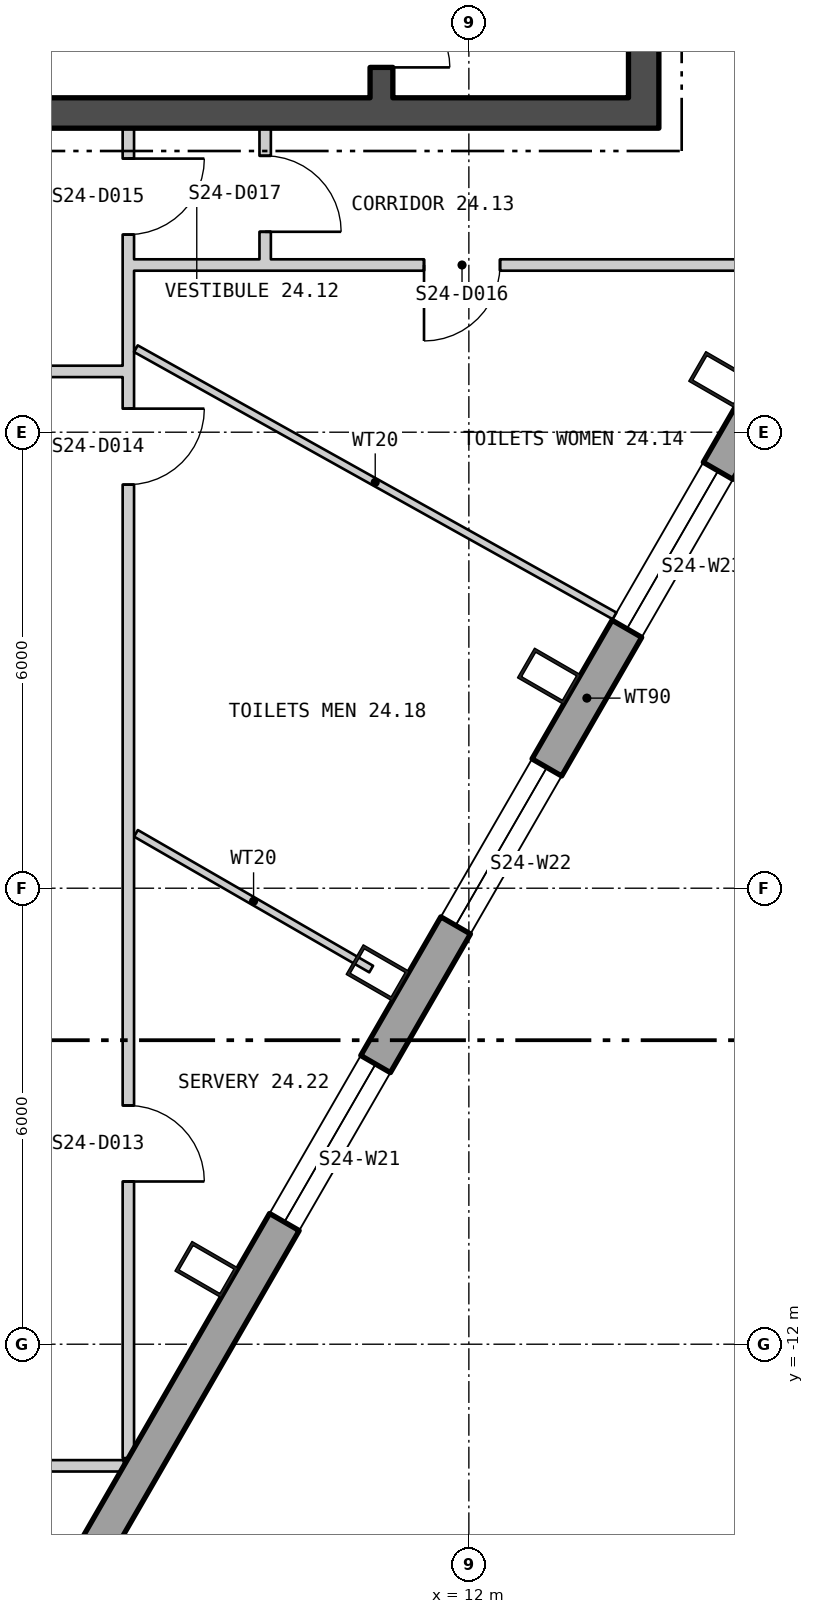
"""IFC4 building model, lengths in metres.
Left out: names, types, materials, properties, quantities, classifications, styles, units other than length and angle.
Written with IfcOpenShell. Run it as: python <this file> out.ifc"""

import sys

from ifc_helpers import new_model, si_unit, direction, frame, frame_2d, origin, origin_2d, place, context, subcontext, project, spatial, polyline, rectangle, hollow_rectangle, outline, extrude, element, fill, save


model = new_model("IFC4")
c1 = context("Model", 3, precision=1e-05, world=origin(), true_north=direction((0.0, 1.0)))
c2 = subcontext(c1, "Body", "Model", "MODEL_VIEW")
j1 = project(units=[si_unit("LENGTHUNIT", "METRE"), si_unit("PLANEANGLEUNIT", "RADIAN")], contexts=[c1])
p1 = place(None, origin())
s1 = spatial("IfcSite", under=j1, at=p1, CompositionType="ELEMENT")
p2 = place(p1, origin())
s2 = spatial("IfcBuilding", under=s1, at=p2, CompositionType="ELEMENT")
p3 = place(p2, frame((0.0, 0.0, 312.6)))
s3 = spatial("IfcBuildingStorey", under=s2, at=p3, CompositionType="ELEMENT", Elevation=312.6)
for number, where, z_axis, x_axis in (
    (1, (8.548, -11.017, 0.0), (0.0, 0.0, 1.0), (0.5, 0.866, 0.0)),
    (2, (10.801, -7.114, 0.0), (0.0, 0.0, 1.0), (0.5, 0.866, 0.0)),
    (3, (13.055, -3.211, 0.0), (0.0, 0.0, 1.0), (0.5, 0.866, 0.0)),
    (4, (15.308, 0.691, 0.0), (0.0, 0.0, 1.0), (0.5, 0.866, 0.0)),
):
    element("IfcColumn", number, at=place(p3, frame(where, z_axis=z_axis, x_axis=x_axis)), inside=s3, PredefinedType="COLUMN", context=c2, shape_type="SweptSolid", body=[
        extrude(hollow_rectangle(XDim=0.45, YDim=0.7, WallThickness=0.04, at=origin_2d()), origin(), (0.0, 0.0, 1.0), 4.2),
    ])
p4 = place(p3, frame((2.12, -23.301, -0.18), z_axis=(0.0, 0.0, 1.0), x_axis=(0.500000141277, 0.866025322218, 0.0)))
e5 = element("IfcWall", 5, at=p4, inside=s3, PredefinedType="SOLIDWALL", context=c2, shape_type="SweptSolid", body=[
    extrude(outline(polyline([(-0.13, -0.225), (45.86, -0.225), (45.6, 0.225), (0.13, 0.225), (-0.13, -0.225)])), origin(), (0.0, 0.0, 1.0), 3.98),
])
p5 = place(p4, frame((1.424, 0.0, 1.08)))
e6 = element("IfcOpeningElement", 6, at=p5, cuts=e5, PredefinedType="OPENING", context=c2, shape_type="SweptSolid", body=[
    extrude(rectangle(XDim=2.4, YDim=2.3, at=frame_2d((1.2, 1.15))), frame((0.0, 0.235, 0.0), z_axis=(0.0, -1.0, 0.0), x_axis=(1.0, 0.0, 0.0)), (0.0, 0.0, 1.0), 0.47),
])
p6 = place(p4, frame((5.892, 0.0, 1.08)))
e7 = element("IfcOpeningElement", 7, at=p6, cuts=e5, PredefinedType="OPENING", context=c2, shape_type="SweptSolid", body=[
    extrude(rectangle(XDim=2.4, YDim=2.3, at=frame_2d((1.2, 1.15))), frame((0.0, 0.235, 0.0), z_axis=(0.0, -1.0, 0.0), x_axis=(1.0, 0.0, 0.0)), (0.0, 0.0, 1.0), 0.47),
])
p7 = place(p4, frame((14.905, 0.0, 1.08)))
e8 = element("IfcOpeningElement", 8, at=p7, cuts=e5, PredefinedType="OPENING", context=c2, shape_type="SweptSolid", body=[
    extrude(rectangle(XDim=2.4, YDim=2.3, at=frame_2d((1.2, 1.15))), frame((0.0, 0.235, 0.0), z_axis=(0.0, -1.0, 0.0), x_axis=(1.0, 0.0, 0.0)), (0.0, 0.0, 1.0), 0.47),
])
p8 = place(p4, frame((19.412, 0.0, 1.08)))
e9 = element("IfcOpeningElement", 9, at=p8, cuts=e5, PredefinedType="OPENING", context=c2, shape_type="SweptSolid", body=[
    extrude(rectangle(XDim=2.4, YDim=2.3, at=frame_2d((1.2, 1.15))), frame((0.0, 0.235, 0.0), z_axis=(0.0, -1.0, 0.0), x_axis=(1.0, 0.0, 0.0)), (0.0, 0.0, 1.0), 0.47),
])
p9 = place(p4, frame((23.918, 0.0, 1.08)))
e10 = element("IfcOpeningElement", 10, at=p9, cuts=e5, PredefinedType="OPENING", context=c2, shape_type="SweptSolid", body=[
    extrude(rectangle(XDim=2.4, YDim=2.3, at=frame_2d((1.2, 1.15))), frame((0.0, 0.235, 0.0), z_axis=(0.0, -1.0, 0.0), x_axis=(1.0, 0.0, 0.0)), (0.0, 0.0, 1.0), 0.47),
])
p10 = place(p4, frame((28.425, 0.0, 1.08)))
e11 = element("IfcOpeningElement", 11, at=p10, cuts=e5, PredefinedType="OPENING", context=c2, shape_type="SweptSolid", body=[
    extrude(rectangle(XDim=2.4, YDim=2.3, at=frame_2d((1.2, 1.15))), frame((0.0, 0.235, 0.0), z_axis=(0.0, -1.0, 0.0), x_axis=(1.0, 0.0, 0.0)), (0.0, 0.0, 1.0), 0.47),
])
p11 = place(p4, frame((37.438, 0.0, 1.08)))
e12 = element("IfcOpeningElement", 12, at=p11, cuts=e5, PredefinedType="OPENING", context=c2, shape_type="SweptSolid", body=[
    extrude(rectangle(XDim=2.4, YDim=2.3, at=frame_2d((1.2, 1.15))), frame((0.0, 0.235, 0.0), z_axis=(0.0, -1.0, 0.0), x_axis=(1.0, 0.0, 0.0)), (0.0, 0.0, 1.0), 0.47),
])
p12 = place(p4, frame((41.907, 0.0, 1.08)))
e13 = element("IfcOpeningElement", 13, at=p12, cuts=e5, PredefinedType="OPENING", context=c2, shape_type="SweptSolid", body=[
    extrude(rectangle(XDim=2.4, YDim=2.3, at=frame_2d((1.2, 1.15))), frame((0.0, 0.235, 0.0), z_axis=(0.0, -1.0, 0.0), x_axis=(1.0, 0.0, 0.0)), (0.0, 0.0, 1.0), 0.47),
])
p13 = place(p3, frame((-14.5, 4.2, 0.0), z_axis=(0.0, 0.0, 1.0), x_axis=(1.0, 0.0, 0.0)))
e14 = element("IfcWall", 14, at=p13, inside=s3, PredefinedType="SHEAR", context=c2, shape_type="SweptSolid", body=[
    extrude(rectangle(XDim=29.0, YDim=0.4, at=frame_2d((14.5, 0.0))), origin(), (0.0, 0.0, 1.0), 4.0),
])
p14 = place(p13, frame((9.0, 0.0, 0.0)))
e15 = element("IfcOpeningElement", 15, at=p14, cuts=e14, PredefinedType="OPENING", context=c2, shape_type="SweptSolid", body=[
    extrude(rectangle(XDim=1.8, YDim=2.4, at=frame_2d((0.9, 1.2))), frame((0.0, 0.21, 0.0), z_axis=(0.0, -1.0, 0.0), x_axis=(1.0, 0.0, 0.0)), (0.0, 0.0, 1.0), 0.42),
])
p15 = place(p13, frame((19.0, 0.0, 0.0)))
e16 = element("IfcOpeningElement", 16, at=p15, cuts=e14, PredefinedType="OPENING", context=c2, shape_type="SweptSolid", body=[
    extrude(rectangle(XDim=1.8, YDim=2.4, at=frame_2d((0.9, 1.2))), frame((0.0, 0.21, 0.0), z_axis=(0.0, -1.0, 0.0), x_axis=(1.0, 0.0, 0.0)), (0.0, 0.0, 1.0), 0.42),
])
p16 = place(p3, frame((14.3, 4.4, 0.0), z_axis=(0.0, 0.0, 1.0), x_axis=(0.0, 1.0, 0.0)))
e17 = element("IfcWall", 17, at=p16, inside=s3, PredefinedType="SHEAR", context=c2, shape_type="SweptSolid", body=[
    extrude(rectangle(XDim=13.2, YDim=0.4, at=frame_2d((6.6, 0.0))), origin(), (0.0, 0.0, 1.0), 4.0),
])
p17 = place(p16, frame((3.05, 0.0, 0.0)))
e18 = element("IfcOpeningElement", 18, at=p17, cuts=e17, PredefinedType="OPENING", context=c2, shape_type="SweptSolid", body=[
    extrude(rectangle(XDim=1.5, YDim=2.1, at=frame_2d((0.75, 1.05))), frame((0.0, 0.21, 0.0), z_axis=(0.0, -1.0, 0.0), x_axis=(1.0, 0.0, 0.0)), (0.0, 0.0, 1.0), 0.42),
])
p18 = place(p3, frame((10.85, 4.4, 0.0), z_axis=(0.0, 0.0, 1.0), x_axis=(0.0, 1.0, 0.0)))
e19 = element("IfcWall", 19, at=p18, inside=s3, PredefinedType="SHEAR", context=c2, shape_type="SweptSolid", body=[
    extrude(rectangle(XDim=13.2, YDim=0.3, at=frame_2d((6.6, 0.0))), origin(), (0.0, 0.0, 1.0), 4.0),
])
p19 = place(p18, frame((1.575, 0.0, 0.0)))
e20 = element("IfcOpeningElement", 20, at=p19, cuts=e19, PredefinedType="OPENING", context=c2, shape_type="SweptSolid", body=[
    extrude(rectangle(XDim=1.25, YDim=2.1, at=frame_2d((0.625, 1.05))), frame((0.0, 0.16, 0.0), z_axis=(0.0, -1.0, 0.0), x_axis=(1.0, 0.0, 0.0)), (0.0, 0.0, 1.0), 0.32),
])
p20 = place(p18, frame((0.4, 0.0, 0.0)))
e21 = element("IfcOpeningElement", 21, at=p20, cuts=e19, PredefinedType="OPENING", context=c2, shape_type="SweptSolid", body=[
    extrude(rectangle(XDim=0.9, YDim=2.1, at=frame_2d((0.45, 1.05))), frame((0.0, 0.16, 0.0), z_axis=(0.0, -1.0, 0.0), x_axis=(1.0, 0.0, 0.0)), (0.0, 0.0, 1.0), 0.32),
])
p21 = place(p3, frame((-7.52, 0.8, 0.0), z_axis=(0.0, 0.0, 1.0), x_axis=(1.0, 0.0, 0.0)))
e22 = element("IfcWall", 22, at=p21, inside=s3, PredefinedType="PARTITIONING", context=c2, shape_type="SweptSolid", body=[
    extrude(rectangle(XDim=14.965, YDim=0.15, at=frame_2d((7.482, 0.0))), origin(), (0.0, 0.0, 1.0), 4.0),
])
p22 = place(p21, frame((1.206, 0.0, 0.0)))
e23 = element("IfcOpeningElement", 23, at=p22, cuts=e22, PredefinedType="OPENING", context=c2, shape_type="SweptSolid", body=[
    extrude(rectangle(XDim=1.0, YDim=2.1, at=frame_2d((0.5, 1.05))), frame((0.0, 0.085, 0.0), z_axis=(0.0, -1.0, 0.0), x_axis=(1.0, 0.0, 0.0)), (0.0, 0.0, 1.0), 0.17),
])
p23 = place(p21, frame((12.796, 0.0, 0.0)))
e24 = element("IfcOpeningElement", 24, at=p23, cuts=e22, PredefinedType="OPENING", context=c2, shape_type="SweptSolid", body=[
    extrude(rectangle(XDim=1.0, YDim=2.1, at=frame_2d((0.5, 1.05))), frame((0.0, 0.085, 0.0), z_axis=(0.0, -1.0, 0.0), x_axis=(1.0, 0.0, 0.0)), (0.0, 0.0, 1.0), 0.17),
])
p24 = place(p3, frame((4.3, -13.6, 0.0), z_axis=(0.0, 0.0, 1.0), x_axis=(1.0, 0.0, 0.0)))
e25 = element("IfcWall", 25, at=p24, inside=s3, PredefinedType="PARTITIONING", context=c2, shape_type="SweptSolid", body=[
    extrude(rectangle(XDim=2.555, YDim=0.15, at=frame_2d((1.278, 0.0))), origin(), (0.0, 0.0, 1.0), 3.21),
])
p25 = place(p24, frame((0.2, 0.0, 0.0)))
e26 = element("IfcOpeningElement", 26, at=p25, cuts=e25, PredefinedType="OPENING", context=c2, shape_type="SweptSolid", body=[
    extrude(rectangle(XDim=1.0, YDim=2.1, at=frame_2d((0.5, 1.05))), frame((0.0, 0.085, 0.0), z_axis=(0.0, -1.0, 0.0), x_axis=(1.0, 0.0, 0.0)), (0.0, 0.0, 1.0), 0.17),
])
p26 = place(p3, frame((6.855, -13.6, 0.0), z_axis=(0.0, 0.0, 1.0), x_axis=(1.0, 0.0, 0.0)))
e27 = element("IfcWall", 27, at=p26, inside=s3, PredefinedType="PARTITIONING", context=c2, shape_type="SweptSolid", body=[
    extrude(rectangle(XDim=0.606, YDim=0.15, at=frame_2d((0.303, 0.0))), origin(), (0.0, 0.0, 1.0), 4.0),
])
p27 = place(p3, frame((7.52, -13.498, 0.0), z_axis=(0.0, 0.0, 1.0), x_axis=(0.0, 1.0, 0.0)))
e28 = element("IfcWall", 28, at=p27, inside=s3, PredefinedType="PARTITIONING", context=c2, shape_type="SweptSolid", body=[
    extrude(rectangle(XDim=17.498, YDim=0.15, at=frame_2d((8.749, 0.0))), origin(), (0.0, 0.0, 1.0), 4.0),
])
p28 = place(p27, frame((3.639, 0.0, 0.0)))
e29 = element("IfcOpeningElement", 29, at=p28, cuts=e28, PredefinedType="OPENING", context=c2, shape_type="SweptSolid", body=[
    extrude(rectangle(XDim=1.0, YDim=2.1, at=frame_2d((0.5, 1.05))), frame((0.0, 0.085, 0.0), z_axis=(0.0, -1.0, 0.0), x_axis=(1.0, 0.0, 0.0)), (0.0, 0.0, 1.0), 0.17),
])
p29 = place(p27, frame((12.808, 0.0, 0.0)))
e30 = element("IfcOpeningElement", 30, at=p29, cuts=e28, PredefinedType="OPENING", context=c2, shape_type="SweptSolid", body=[
    extrude(rectangle(XDim=1.0, YDim=2.1, at=frame_2d((0.5, 1.05))), frame((0.0, 0.085, 0.0), z_axis=(0.0, -1.0, 0.0), x_axis=(1.0, 0.0, 0.0)), (0.0, 0.0, 1.0), 0.17),
])
p30 = place(p27, frame((16.098, 0.0, 0.0)))
e31 = element("IfcOpeningElement", 31, at=p30, cuts=e28, PredefinedType="OPENING", context=c2, shape_type="SweptSolid", body=[
    extrude(rectangle(XDim=1.0, YDim=2.1, at=frame_2d((0.5, 1.05))), frame((0.0, 0.085, 0.0), z_axis=(0.0, -1.0, 0.0), x_axis=(1.0, 0.0, 0.0)), (0.0, 0.0, 1.0), 0.17),
])
p31 = place(p3, frame((7.595, 2.2, 0.0), z_axis=(0.0, 0.0, 1.0), x_axis=(1.0, 0.0, 0.0)))
e32 = element("IfcWall", 32, at=p31, inside=s3, PredefinedType="PARTITIONING", context=c2, shape_type="SweptSolid", body=[
    extrude(rectangle(XDim=8.63, YDim=0.15, at=frame_2d((4.315, 0.0))), origin(), (0.0, 0.0, 1.0), 4.0),
])
p32 = place(p31, frame((3.815, 0.0, 0.0)))
e33 = element("IfcOpeningElement", 33, at=p32, cuts=e32, PredefinedType="OPENING", context=c2, shape_type="SweptSolid", body=[
    extrude(rectangle(XDim=1.0, YDim=2.1, at=frame_2d((0.5, 1.05))), frame((0.0, 0.085, 0.0), z_axis=(0.0, -1.0, 0.0), x_axis=(1.0, 0.0, 0.0)), (0.0, 0.0, 1.0), 0.17),
])
p33 = place(p3, frame((7.619, 1.099, 0.0), z_axis=(0.0, 0.0, 1.0), x_axis=(0.873148302033, -0.487454657026, 0.0)))
e34 = element("IfcWall", 34, at=p33, inside=s3, PredefinedType="PARTITIONING", context=c2, shape_type="SweptSolid", body=[
    extrude(rectangle(XDim=7.213, YDim=0.1, at=frame_2d((3.607, 0.0))), origin(), (0.0, 0.0, 1.0), 4.0),
])
p34 = place(p3, frame((7.62, -5.278, 0.0), z_axis=(0.0, 0.0, 1.0), x_axis=(0.866134332687, -0.499811282126, 0.0)))
e35 = element("IfcWall", 35, at=p34, inside=s3, PredefinedType="PARTITIONING", context=c2, shape_type="SweptSolid", body=[
    extrude(rectangle(XDim=3.573, YDim=0.1, at=frame_2d((1.787, 0.0))), origin(), (0.0, 0.0, 1.0), 4.0),
])
p35 = place(p3, frame((9.32, 2.275, 0.0), z_axis=(0.0, 0.0, 1.0), x_axis=(0.0, 1.0, 0.0)))
e36 = element("IfcWall", 36, at=p35, inside=s3, PredefinedType="PARTITIONING", context=c2, shape_type="SweptSolid", body=[
    extrude(rectangle(XDim=1.725, YDim=0.15, at=frame_2d((0.863, 0.0))), origin(), (0.0, 0.0, 1.0), 4.0),
])
p36 = place(p35, frame((0.362, 0.0, 0.0)))
e37 = element("IfcOpeningElement", 37, at=p36, cuts=e36, PredefinedType="OPENING", context=c2, shape_type="SweptSolid", body=[
    extrude(rectangle(XDim=1.0, YDim=2.1, at=frame_2d((0.5, 1.05))), frame((0.0, 0.085, 0.0), z_axis=(0.0, -1.0, 0.0), x_axis=(1.0, 0.0, 0.0)), (0.0, 0.0, 1.0), 0.17),
])
p37 = place(p7, origin())
e38 = element("IfcWindow", 38, at=p37, inside=s3, PartitioningType="SINGLE_PANEL", PredefinedType="WINDOW", context=c2, shape_type="SweptSolid", body=[
    extrude(rectangle(XDim=2.4, YDim=2.3, at=frame_2d((1.2, 1.15))), frame((0.0, 0.105, 0.0), z_axis=(0.0, -1.0, 0.0), x_axis=(1.0, 0.0, 0.0)), (0.0, 0.0, 1.0), 0.06),
])
fill(e8, e38)
p38 = place(p8, origin())
e39 = element("IfcWindow", 39, at=p38, inside=s3, PartitioningType="SINGLE_PANEL", PredefinedType="WINDOW", context=c2, shape_type="SweptSolid", body=[
    extrude(rectangle(XDim=2.4, YDim=2.3, at=frame_2d((1.2, 1.15))), frame((0.0, 0.105, 0.0), z_axis=(0.0, -1.0, 0.0), x_axis=(1.0, 0.0, 0.0)), (0.0, 0.0, 1.0), 0.06),
])
fill(e9, e39)
p39 = place(p9, origin())
e40 = element("IfcWindow", 40, at=p39, inside=s3, PartitioningType="SINGLE_PANEL", PredefinedType="WINDOW", context=c2, shape_type="SweptSolid", body=[
    extrude(rectangle(XDim=2.4, YDim=2.3, at=frame_2d((1.2, 1.15))), frame((0.0, 0.105, 0.0), z_axis=(0.0, -1.0, 0.0), x_axis=(1.0, 0.0, 0.0)), (0.0, 0.0, 1.0), 0.06),
])
fill(e10, e40)
p40 = place(p20, origin())
e41 = element("IfcDoor", 41, at=p40, inside=s3, OperationType="SINGLE_SWING_LEFT", PredefinedType="DOOR", context=c2, shape_type="SweptSolid", body=[
    extrude(rectangle(XDim=0.9, YDim=2.1, at=frame_2d((0.45, 1.05))), frame((0.0, 0.025, 0.0), z_axis=(0.0, -1.0, 0.0), x_axis=(1.0, 0.0, 0.0)), (0.0, 0.0, 1.0), 0.05),
])
fill(e21, e41)
p41 = place(p28, origin())
e42 = element("IfcDoor", 42, at=p41, inside=s3, OperationType="SINGLE_SWING_LEFT", PredefinedType="DOOR", context=c2, shape_type="SweptSolid", body=[
    extrude(rectangle(XDim=1.0, YDim=2.1, at=frame_2d((0.5, 1.05))), frame((0.0, 0.025, 0.0), z_axis=(0.0, -1.0, 0.0), x_axis=(1.0, 0.0, 0.0)), (0.0, 0.0, 1.0), 0.05),
])
fill(e29, e42)
p42 = place(p29, origin())
e43 = element("IfcDoor", 43, at=p42, inside=s3, OperationType="SINGLE_SWING_RIGHT", PredefinedType="DOOR", context=c2, shape_type="SweptSolid", body=[
    extrude(rectangle(XDim=1.0, YDim=2.1, at=frame_2d((0.5, 1.05))), frame((0.0, 0.025, 0.0), z_axis=(0.0, -1.0, 0.0), x_axis=(1.0, 0.0, 0.0)), (0.0, 0.0, 1.0), 0.05),
])
fill(e30, e43)
p43 = place(p30, origin())
e44 = element("IfcDoor", 44, at=p43, inside=s3, OperationType="SINGLE_SWING_RIGHT", PredefinedType="DOOR", context=c2, shape_type="SweptSolid", body=[
    extrude(rectangle(XDim=1.0, YDim=2.1, at=frame_2d((0.5, 1.05))), frame((0.0, 0.025, 0.0), z_axis=(0.0, -1.0, 0.0), x_axis=(1.0, 0.0, 0.0)), (0.0, 0.0, 1.0), 0.05),
])
fill(e31, e44)
p44 = place(p32, origin())
e45 = element("IfcDoor", 45, at=p44, inside=s3, OperationType="SINGLE_SWING_LEFT", PredefinedType="DOOR", context=c2, shape_type="SweptSolid", body=[
    extrude(rectangle(XDim=1.0, YDim=2.1, at=frame_2d((0.5, 1.05))), frame((0.0, 0.025, 0.0), z_axis=(0.0, -1.0, 0.0), x_axis=(1.0, 0.0, 0.0)), (0.0, 0.0, 1.0), 0.05),
])
fill(e33, e45)
p45 = place(p36, origin())
e46 = element("IfcDoor", 46, at=p45, inside=s3, OperationType="SINGLE_SWING_LEFT", PredefinedType="DOOR", context=c2, shape_type="SweptSolid", body=[
    extrude(rectangle(XDim=1.0, YDim=2.1, at=frame_2d((0.5, 1.05))), frame((0.0, 0.025, 0.0), z_axis=(0.0, -1.0, 0.0), x_axis=(1.0, 0.0, 0.0)), (0.0, 0.0, 1.0), 0.05),
])
fill(e37, e46)
save(model, sys.argv[1])
